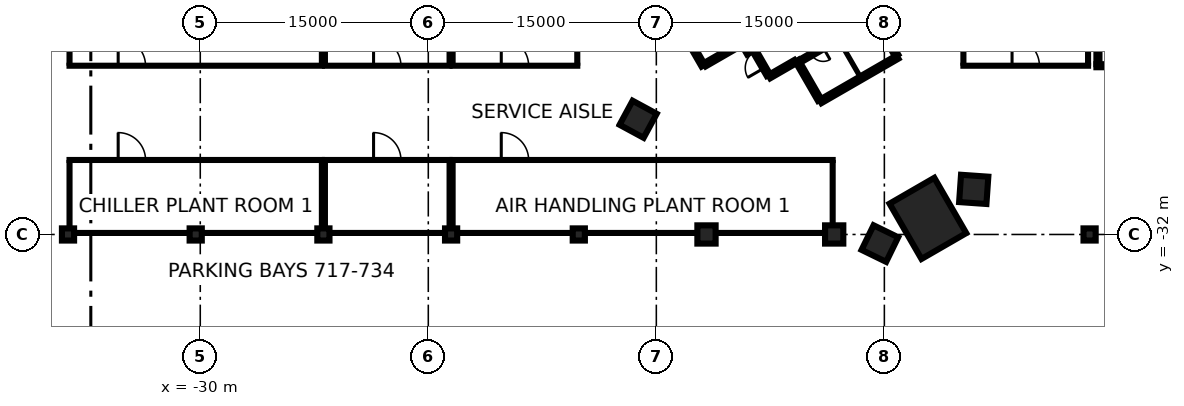
"""IFC4 building model, lengths in metres.
Left out: names, types, materials, properties, quantities, classifications, styles, units other than length and angle.
Written with IfcOpenShell. Run it as: python <this file> out.ifc"""

import sys

from ifc_helpers import new_model, si_unit, direction, frame, frame_2d, origin, origin_2d, place, context, subcontext, project, spatial, rectangle, extrude, element, fill, save


model = new_model("IFC4")
c1 = context("Model", 3, precision=1e-05, world=origin(), true_north=direction((0.0, 1.0)))
c2 = subcontext(c1, "Body", "Model", "MODEL_VIEW")
j1 = project(units=[si_unit("LENGTHUNIT", "METRE"), si_unit("PLANEANGLEUNIT", "RADIAN")], contexts=[c1])
p1 = place(None, origin())
s1 = spatial("IfcSite", under=j1, at=p1, CompositionType="ELEMENT")
p2 = place(p1, origin())
s2 = spatial("IfcBuilding", under=s1, at=p2, CompositionType="ELEMENT")
p3 = place(p2, frame((0.0, 0.0, -7.2)))
s3 = spatial("IfcBuildingStorey", under=s2, at=p3, CompositionType="ELEMENT", Elevation=-7.2)
p4 = place(p3, frame((17.865, -30.942, -0.4), z_axis=(0.0, 0.0, 1.0), x_axis=(-0.5, 0.866025403784, 0.0)))
e1 = element("IfcColumn", 1, at=p4, inside=s3, PredefinedType="COLUMN", context=c2, shape_type="SweptSolid", body=[
    extrude(rectangle(XDim=4.2, YDim=3.4, at=origin_2d()), origin(), (0.0, 0.0, 1.0), 3.6),
])
for number, where, z_axis, x_axis in (
    (2, (20.879, -29.034, -0.4), (0.0, 0.0, 1.0), (-0.998, 0.07, 0.0)),
    (3, (-1.197, -24.423, -0.4), (0.0, 0.0, 1.0), (0.476, 0.879, 0.0)),
    (4, (14.705, -32.599, -0.4), (0.0, 0.0, 1.0), (0.438, 0.899, 0.0)),
):
    element("IfcColumn", number, at=place(p3, frame(where, z_axis=z_axis, x_axis=x_axis)), inside=s3, PredefinedType="COLUMN", context=c2, shape_type="SweptSolid", body=[
        extrude(rectangle(XDim=1.8, YDim=1.8, at=origin_2d()), origin(), (0.0, 0.0, 1.0), 3.6),
    ])
for number, where, z_axis, x_axis in (
    (5, (-38.7, -32.0, -0.4), (0.0, 0.0, 1.0), (1.0, 0.0, 0.0)),
    (6, (-30.3, -32.0, -0.4), (0.0, 0.0, 1.0), (1.0, 0.0, 0.0)),
    (7, (-21.9, -32.0, -0.4), (0.0, 0.0, 1.0), (1.0, 0.0, 0.0)),
    (8, (-13.5, -32.0, -0.4), (0.0, 0.0, 1.0), (1.0, 0.0, 0.0)),
    (9, (-5.1, -32.0, -0.4), (0.0, 0.0, 1.0), (1.0, 0.0, 0.0)),
):
    element("IfcColumn", number, at=place(p3, frame(where, z_axis=z_axis, x_axis=x_axis)), inside=s3, PredefinedType="COLUMN", context=c2, shape_type="SweptSolid", body=[
        extrude(rectangle(XDim=0.8, YDim=0.8, at=origin_2d()), origin(), (0.0, 0.0, 1.0), 3.6),
    ])
for number, where, z_axis, x_axis in (
    (10, (3.3, -32.0, -0.4), (0.0, 0.0, 1.0), (1.0, 0.0, 0.0)),
    (11, (11.7, -32.0, -0.4), (0.0, 0.0, 1.0), (1.0, 0.0, 0.0)),
):
    element("IfcColumn", number, at=place(p3, frame(where, z_axis=z_axis, x_axis=x_axis)), inside=s3, PredefinedType="COLUMN", context=c2, shape_type="SweptSolid", body=[
        extrude(rectangle(XDim=1.2, YDim=1.2, at=origin_2d()), origin(), (0.0, 0.0, 1.0), 3.6),
    ])
p5 = place(p3, frame((28.5, -32.0, -0.4), z_axis=(0.0, 0.0, 1.0), x_axis=(1.0, 0.0, 0.0)))
e12 = element("IfcColumn", 12, at=p5, inside=s3, PredefinedType="COLUMN", context=c2, shape_type="SweptSolid", body=[
    extrude(rectangle(XDim=0.8, YDim=0.8, at=origin_2d()), origin(), (0.0, 0.0, 1.0), 3.6),
])
p6 = place(p3, frame((15.865, -20.328, 0.0), z_axis=(0.0, 0.0, 1.0), x_axis=(-0.86602852612, -0.499994591916, 0.0)))
e13 = element("IfcWall", 13, at=p6, inside=s3, PredefinedType="SHEAR", context=c2, shape_type="SweptSolid", body=[
    extrude(rectangle(XDim=5.85, YDim=0.25, at=frame_2d((2.925, 0.0))), origin(), (0.0, 0.0, 1.0), 3.2),
])
for number, where, z_axis, x_axis in (
    (14, (14.315, -17.644, 0.0), (0.0, 0.0, 1.0), (0.5, -0.866, 0.0)),
    (15, (10.736, -23.145, 0.0), (0.0, 0.0, 1.0), (-0.5, 0.866, 0.0)),
):
    element("IfcWall", number, at=place(p3, frame(where, z_axis=z_axis, x_axis=x_axis)), inside=s3, PredefinedType="SHEAR", context=c2, shape_type="SweptSolid", body=[
        extrude(rectangle(XDim=2.974, YDim=0.25, at=frame_2d((1.487, 0.0))), origin(), (0.0, 0.0, 1.0), 3.2),
    ])
p7 = place(p3, frame((3.085, -20.894, 0.0), z_axis=(0.0, 0.0, 1.0), x_axis=(-0.499978833458, 0.866037623948, 0.0)))
e16 = element("IfcWall", 16, at=p7, inside=s3, PredefinedType="SHEAR", context=c2, shape_type="SweptSolid", body=[
    extrude(rectangle(XDim=3.05, YDim=0.25, at=frame_2d((1.525, 0.0))), origin(), (0.0, 0.0, 1.0), 3.2),
])
p8 = place(p3, frame((5.675, -19.399, 0.0), z_axis=(0.0, 0.0, 1.0), x_axis=(-0.866026637627, -0.499997862916, 0.0)))
e17 = element("IfcWall", 17, at=p8, inside=s3, PredefinedType="SHEAR", context=c2, shape_type="SweptSolid", body=[
    extrude(rectangle(XDim=2.865, YDim=0.25, at=frame_2d((1.432, 0.0))), origin(), (0.0, 0.0, 1.0), 3.2),
])
p9 = place(p3, frame((9.14, -20.631, 0.0), z_axis=(0.0, 0.0, 1.0), x_axis=(-0.866043531843, -0.499968599967, 0.0)))
e18 = element("IfcWall", 18, at=p9, inside=s3, PredefinedType="SHEAR", context=c2, shape_type="SweptSolid", body=[
    extrude(rectangle(XDim=1.975, YDim=0.25, at=frame_2d((0.987, 0.0))), origin(), (0.0, 0.0, 1.0), 3.2),
])
p10 = place(p3, frame((7.367, -21.51, 0.0), z_axis=(0.0, 0.0, 1.0), x_axis=(-0.499983108224, 0.866035156036, 0.0)))
e19 = element("IfcWall", 19, at=p10, inside=s3, PredefinedType="SHEAR", context=c2, shape_type="SweptSolid", body=[
    extrude(rectangle(XDim=1.865, YDim=0.25, at=frame_2d((0.932, 0.0))), origin(), (0.0, 0.0, 1.0), 3.2),
])
p11 = place(p10, frame((0.535, 0.0, 0.0)))
e20 = element("IfcOpeningElement", 20, at=p11, cuts=e19, PredefinedType="OPENING", context=c2, shape_type="SweptSolid", body=[
    extrude(rectangle(XDim=1.25, YDim=2.1, at=frame_2d((0.625, 1.05))), frame((0.0, 0.135, 0.0), z_axis=(0.0, -1.0, 0.0), x_axis=(1.0, 0.0, 0.0)), (0.0, 0.0, 1.0), 0.27),
])
p12 = place(p3, frame((6.08, -20.1, 0.0), z_axis=(0.0, 0.0, 1.0), x_axis=(-0.500051773299, 0.865995510393, 0.0)))
e21 = element("IfcWall", 21, at=p12, inside=s3, PredefinedType="SHEAR", context=c2, shape_type="SweptSolid", body=[
    extrude(rectangle(XDim=0.685, YDim=0.25, at=frame_2d((0.342, 0.0))), origin(), (0.0, 0.0, 1.0), 3.2),
])
p13 = place(p3, frame((14.268, -17.815, 0.0), z_axis=(0.0, 0.0, 1.0), x_axis=(-0.866033794273, -0.499985466966, 0.0)))
e22 = element("IfcWall", 22, at=p13, inside=s3, PredefinedType="SHEAR", context=c2, shape_type="SweptSolid", body=[
    extrude(rectangle(XDim=5.598, YDim=0.2, at=frame_2d((2.799, 0.0))), origin(), (0.0, 0.0, 1.0), 3.2),
])
p14 = place(p13, frame((3.799, 0.0, 0.0)))
e23 = element("IfcOpeningElement", 23, at=p14, cuts=e22, PredefinedType="OPENING", context=c2, shape_type="SweptSolid", body=[
    extrude(rectangle(XDim=0.9, YDim=2.1, at=frame_2d((0.45, 1.05))), frame((0.0, 0.11, 0.0), z_axis=(0.0, -1.0, 0.0), x_axis=(1.0, 0.0, 0.0)), (0.0, 0.0, 1.0), 0.22),
])
p15 = place(p13, frame((0.749, 0.0, 0.0)))
e24 = element("IfcOpeningElement", 24, at=p15, cuts=e22, PredefinedType="OPENING", context=c2, shape_type="SweptSolid", body=[
    extrude(rectangle(XDim=0.9, YDim=2.1, at=frame_2d((0.45, 1.05))), frame((0.0, 0.11, 0.0), z_axis=(0.0, -1.0, 0.0), x_axis=(1.0, 0.0, 0.0)), (0.0, 0.0, 1.0), 0.22),
])
p16 = place(p3, frame((12.024, -19.227, 0.0), z_axis=(0.0, 0.0, 1.0), x_axis=(0.499988999718, -0.866031754707, 0.0)))
e25 = element("IfcWall", 25, at=p16, inside=s3, PredefinedType="PARTITIONING", context=c2, shape_type="SweptSolid", body=[
    extrude(rectangle(XDim=2.749, YDim=0.15, at=frame_2d((1.374, 0.0))), origin(), (0.0, 0.0, 1.0), 3.2),
])
p17 = place(p3, frame((-38.7, -31.9, 0.0), z_axis=(0.0, 0.0, 1.0), x_axis=(1.0, 0.0, 0.0)))
e26 = element("IfcWall", 26, at=p17, inside=s3, PredefinedType="PARTITIONING", context=c2, shape_type="SweptSolid", body=[
    extrude(rectangle(XDim=16.8, YDim=0.2, at=frame_2d((8.4, 0.0))), origin(), (0.0, 0.0, 1.0), 3.2),
])
p18 = place(p3, frame((-38.7, -27.1, 0.0), z_axis=(0.0, 0.0, 1.0), x_axis=(1.0, 0.0, 0.0)))
e27 = element("IfcWall", 27, at=p18, inside=s3, PredefinedType="PARTITIONING", context=c2, shape_type="SweptSolid", body=[
    extrude(rectangle(XDim=16.8, YDim=0.2, at=frame_2d((8.4, 0.0))), origin(), (0.0, 0.0, 1.0), 3.2),
])
p19 = place(p18, frame((3.3, 0.0, 0.0)))
e28 = element("IfcOpeningElement", 28, at=p19, cuts=e27, PredefinedType="OPENING", context=c2, shape_type="SweptSolid", body=[
    extrude(rectangle(XDim=1.8, YDim=2.1, at=frame_2d((0.9, 1.05))), frame((0.0, 0.11, 0.0), z_axis=(0.0, -1.0, 0.0), x_axis=(1.0, 0.0, 0.0)), (0.0, 0.0, 1.0), 0.22),
])
for number, where, z_axis, x_axis in (
    (29, (-38.6, -31.6, 0.0), (0.0, 0.0, 1.0), (0.0, 1.0, 0.0)),
    (30, (-22.0, -31.6, 0.0), (0.0, 0.0, 1.0), (0.0, 1.0, 0.0)),
):
    element("IfcWall", number, at=place(p3, frame(where, z_axis=z_axis, x_axis=x_axis)), inside=s3, PredefinedType="PARTITIONING", context=c2, shape_type="SweptSolid", body=[
        extrude(rectangle(XDim=4.4, YDim=0.2, at=frame_2d((2.2, 0.0))), origin(), (0.0, 0.0, 1.0), 3.2),
    ])
p20 = place(p3, frame((-21.9, -31.9, 0.0), z_axis=(0.0, 0.0, 1.0), x_axis=(1.0, 0.0, 0.0)))
e31 = element("IfcWall", 31, at=p20, inside=s3, PredefinedType="PARTITIONING", context=c2, shape_type="SweptSolid", body=[
    extrude(rectangle(XDim=8.4, YDim=0.2, at=frame_2d((4.2, 0.0))), origin(), (0.0, 0.0, 1.0), 3.2),
])
p21 = place(p3, frame((-21.9, -27.1, 0.0), z_axis=(0.0, 0.0, 1.0), x_axis=(1.0, 0.0, 0.0)))
e32 = element("IfcWall", 32, at=p21, inside=s3, PredefinedType="PARTITIONING", context=c2, shape_type="SweptSolid", body=[
    extrude(rectangle(XDim=8.4, YDim=0.2, at=frame_2d((4.2, 0.0))), origin(), (0.0, 0.0, 1.0), 3.2),
])
p22 = place(p21, frame((3.3, 0.0, 0.0)))
e33 = element("IfcOpeningElement", 33, at=p22, cuts=e32, PredefinedType="OPENING", context=c2, shape_type="SweptSolid", body=[
    extrude(rectangle(XDim=1.8, YDim=2.1, at=frame_2d((0.9, 1.05))), frame((0.0, 0.11, 0.0), z_axis=(0.0, -1.0, 0.0), x_axis=(1.0, 0.0, 0.0)), (0.0, 0.0, 1.0), 0.22),
])
for number, where, z_axis, x_axis in (
    (34, (-21.8, -31.6, 0.0), (0.0, 0.0, 1.0), (0.0, 1.0, 0.0)),
    (35, (-13.6, -31.6, 0.0), (0.0, 0.0, 1.0), (0.0, 1.0, 0.0)),
):
    element("IfcWall", number, at=place(p3, frame(where, z_axis=z_axis, x_axis=x_axis)), inside=s3, PredefinedType="PARTITIONING", context=c2, shape_type="SweptSolid", body=[
        extrude(rectangle(XDim=4.4, YDim=0.2, at=frame_2d((2.2, 0.0))), origin(), (0.0, 0.0, 1.0), 3.2),
    ])
p23 = place(p3, frame((-13.5, -31.9, 0.0), z_axis=(0.0, 0.0, 1.0), x_axis=(1.0, 0.0, 0.0)))
e36 = element("IfcWall", 36, at=p23, inside=s3, PredefinedType="PARTITIONING", context=c2, shape_type="SweptSolid", body=[
    extrude(rectangle(XDim=25.2, YDim=0.2, at=frame_2d((12.6, 0.0))), origin(), (0.0, 0.0, 1.0), 3.2),
])
p24 = place(p3, frame((-13.5, -27.1, 0.0), z_axis=(0.0, 0.0, 1.0), x_axis=(1.0, 0.0, 0.0)))
e37 = element("IfcWall", 37, at=p24, inside=s3, PredefinedType="PARTITIONING", context=c2, shape_type="SweptSolid", body=[
    extrude(rectangle(XDim=25.2, YDim=0.2, at=frame_2d((12.6, 0.0))), origin(), (0.0, 0.0, 1.0), 3.2),
])
p25 = place(p24, frame((3.3, 0.0, 0.0)))
e38 = element("IfcOpeningElement", 38, at=p25, cuts=e37, PredefinedType="OPENING", context=c2, shape_type="SweptSolid", body=[
    extrude(rectangle(XDim=1.8, YDim=2.1, at=frame_2d((0.9, 1.05))), frame((0.0, 0.11, 0.0), z_axis=(0.0, -1.0, 0.0), x_axis=(1.0, 0.0, 0.0)), (0.0, 0.0, 1.0), 0.22),
])
p26 = place(p3, frame((-13.4, -31.6, 0.0), z_axis=(0.0, 0.0, 1.0), x_axis=(0.0, 1.0, 0.0)))
e39 = element("IfcWall", 39, at=p26, inside=s3, PredefinedType="PARTITIONING", context=c2, shape_type="SweptSolid", body=[
    extrude(rectangle(XDim=4.4, YDim=0.2, at=frame_2d((2.2, 0.0))), origin(), (0.0, 0.0, 1.0), 3.2),
])
p27 = place(p3, frame((11.6, -31.4, 0.0), z_axis=(0.0, 0.0, 1.0), x_axis=(0.0, 1.0, 0.0)))
e40 = element("IfcWall", 40, at=p27, inside=s3, PredefinedType="PARTITIONING", context=c2, shape_type="SweptSolid", body=[
    extrude(rectangle(XDim=4.2, YDim=0.2, at=frame_2d((2.1, 0.0))), origin(), (0.0, 0.0, 1.0), 3.2),
])
p28 = place(p3, frame((-38.7, -20.9, 0.0), z_axis=(0.0, 0.0, 1.0), x_axis=(1.0, 0.0, 0.0)))
e41 = element("IfcWall", 41, at=p28, inside=s3, PredefinedType="PARTITIONING", context=c2, shape_type="SweptSolid", body=[
    extrude(rectangle(XDim=16.8, YDim=0.2, at=frame_2d((8.4, 0.0))), origin(), (0.0, 0.0, 1.0), 3.2),
])
p29 = place(p28, frame((3.3, 0.0, 0.0)))
e42 = element("IfcOpeningElement", 42, at=p29, cuts=e41, PredefinedType="OPENING", context=c2, shape_type="SweptSolid", body=[
    extrude(rectangle(XDim=1.8, YDim=2.1, at=frame_2d((0.9, 1.05))), frame((0.0, 0.11, 0.0), z_axis=(0.0, -1.0, 0.0), x_axis=(1.0, 0.0, 0.0)), (0.0, 0.0, 1.0), 0.22),
])
for number, where, z_axis, x_axis in (
    (43, (-38.6, -20.8, 0.0), (0.0, 0.0, 1.0), (0.0, 1.0, 0.0)),
    (44, (-22.0, -20.8, 0.0), (0.0, 0.0, 1.0), (0.0, 1.0, 0.0)),
):
    element("IfcWall", number, at=place(p3, frame(where, z_axis=z_axis, x_axis=x_axis)), inside=s3, PredefinedType="PARTITIONING", context=c2, shape_type="SweptSolid", body=[
        extrude(rectangle(XDim=4.2, YDim=0.2, at=frame_2d((2.1, 0.0))), origin(), (0.0, 0.0, 1.0), 3.2),
    ])
p30 = place(p3, frame((-21.9, -20.9, 0.0), z_axis=(0.0, 0.0, 1.0), x_axis=(1.0, 0.0, 0.0)))
e45 = element("IfcWall", 45, at=p30, inside=s3, PredefinedType="PARTITIONING", context=c2, shape_type="SweptSolid", body=[
    extrude(rectangle(XDim=8.4, YDim=0.2, at=frame_2d((4.2, 0.0))), origin(), (0.0, 0.0, 1.0), 3.2),
])
p31 = place(p30, frame((3.3, 0.0, 0.0)))
e46 = element("IfcOpeningElement", 46, at=p31, cuts=e45, PredefinedType="OPENING", context=c2, shape_type="SweptSolid", body=[
    extrude(rectangle(XDim=1.8, YDim=2.1, at=frame_2d((0.9, 1.05))), frame((0.0, 0.11, 0.0), z_axis=(0.0, -1.0, 0.0), x_axis=(1.0, 0.0, 0.0)), (0.0, 0.0, 1.0), 0.22),
])
for number, where, z_axis, x_axis in (
    (47, (-21.8, -20.8, 0.0), (0.0, 0.0, 1.0), (0.0, 1.0, 0.0)),
    (48, (-13.6, -20.8, 0.0), (0.0, 0.0, 1.0), (0.0, 1.0, 0.0)),
):
    element("IfcWall", number, at=place(p3, frame(where, z_axis=z_axis, x_axis=x_axis)), inside=s3, PredefinedType="PARTITIONING", context=c2, shape_type="SweptSolid", body=[
        extrude(rectangle(XDim=4.2, YDim=0.2, at=frame_2d((2.1, 0.0))), origin(), (0.0, 0.0, 1.0), 3.2),
    ])
p32 = place(p3, frame((-13.5, -20.9, 0.0), z_axis=(0.0, 0.0, 1.0), x_axis=(1.0, 0.0, 0.0)))
e49 = element("IfcWall", 49, at=p32, inside=s3, PredefinedType="PARTITIONING", context=c2, shape_type="SweptSolid", body=[
    extrude(rectangle(XDim=8.4, YDim=0.2, at=frame_2d((4.2, 0.0))), origin(), (0.0, 0.0, 1.0), 3.2),
])
p33 = place(p32, frame((3.3, 0.0, 0.0)))
e50 = element("IfcOpeningElement", 50, at=p33, cuts=e49, PredefinedType="OPENING", context=c2, shape_type="SweptSolid", body=[
    extrude(rectangle(XDim=1.8, YDim=2.1, at=frame_2d((0.9, 1.05))), frame((0.0, 0.11, 0.0), z_axis=(0.0, -1.0, 0.0), x_axis=(1.0, 0.0, 0.0)), (0.0, 0.0, 1.0), 0.22),
])
for number, where, z_axis, x_axis in (
    (51, (-13.4, -20.8, 0.0), (0.0, 0.0, 1.0), (0.0, 1.0, 0.0)),
    (52, (-5.2, -20.8, 0.0), (0.0, 0.0, 1.0), (0.0, 1.0, 0.0)),
):
    element("IfcWall", number, at=place(p3, frame(where, z_axis=z_axis, x_axis=x_axis)), inside=s3, PredefinedType="PARTITIONING", context=c2, shape_type="SweptSolid", body=[
        extrude(rectangle(XDim=4.2, YDim=0.2, at=frame_2d((2.1, 0.0))), origin(), (0.0, 0.0, 1.0), 3.2),
    ])
p34 = place(p3, frame((20.1, -20.9, 0.0), z_axis=(0.0, 0.0, 1.0), x_axis=(1.0, 0.0, 0.0)))
e53 = element("IfcWall", 53, at=p34, inside=s3, PredefinedType="PARTITIONING", context=c2, shape_type="SweptSolid", body=[
    extrude(rectangle(XDim=8.4, YDim=0.2, at=frame_2d((4.2, 0.0))), origin(), (0.0, 0.0, 1.0), 3.2),
])
p35 = place(p34, frame((3.3, 0.0, 0.0)))
e54 = element("IfcOpeningElement", 54, at=p35, cuts=e53, PredefinedType="OPENING", context=c2, shape_type="SweptSolid", body=[
    extrude(rectangle(XDim=1.8, YDim=2.1, at=frame_2d((0.9, 1.05))), frame((0.0, 0.11, 0.0), z_axis=(0.0, -1.0, 0.0), x_axis=(1.0, 0.0, 0.0)), (0.0, 0.0, 1.0), 0.22),
])
p36 = place(p3, frame((20.2, -20.8, 0.0), z_axis=(0.0, 0.0, 1.0), x_axis=(0.0, 1.0, 0.0)))
e55 = element("IfcWall", 55, at=p36, inside=s3, PredefinedType="PARTITIONING", context=c2, shape_type="SweptSolid", body=[
    extrude(rectangle(XDim=4.2, YDim=0.2, at=frame_2d((2.1, 0.0))), origin(), (0.0, 0.0, 1.0), 3.2),
])
p37 = place(p3, frame((28.4, -20.8, 0.0), z_axis=(0.0, 0.0, 1.0), x_axis=(0.0, 1.0, 0.0)))
e56 = element("IfcWall", 56, at=p37, inside=s3, PredefinedType="PARTITIONING", context=c2, shape_type="SweptSolid", body=[
    extrude(rectangle(XDim=4.4, YDim=0.2, at=frame_2d((2.2, 0.0))), origin(), (0.0, 0.0, 1.0), 3.2),
])
p38 = place(p3, frame((29.05, -20.8, 0.0), z_axis=(0.0, 0.0, 1.0), x_axis=(0.0, 1.0, 0.0)))
e57 = element("IfcWall", 57, at=p38, inside=s3, PredefinedType="SOLIDWALL", context=c2, shape_type="SweptSolid", body=[
    extrude(rectangle(XDim=9.6, YDim=0.2, at=frame_2d((4.8, 0.0))), origin(), (0.0, 0.0, 1.0), 3.2),
])
p39 = place(p3, frame((33.5, -20.9, 0.0), z_axis=(0.0, 0.0, 1.0), x_axis=(-1.0, 0.0, 0.0)))
e58 = element("IfcWall", 58, at=p39, inside=s3, PredefinedType="SOLIDWALL", context=c2, shape_type="SweptSolid", body=[
    extrude(rectangle(XDim=4.55, YDim=0.2, at=frame_2d((2.275, 0.0))), origin(), (0.0, 0.0, 1.0), 3.2),
])
p40 = place(p11, origin())
e59 = element("IfcDoor", 59, at=p40, inside=s3, OperationType="SINGLE_SWING_LEFT", PredefinedType="DOOR", context=c2, shape_type="SweptSolid", body=[
    extrude(rectangle(XDim=1.25, YDim=2.1, at=frame_2d((0.625, 1.05))), frame((0.0, 0.025, 0.0), z_axis=(0.0, -1.0, 0.0), x_axis=(1.0, 0.0, 0.0)), (0.0, 0.0, 1.0), 0.05),
])
fill(e20, e59)
p41 = place(p14, origin())
e60 = element("IfcDoor", 60, at=p41, inside=s3, OperationType="SINGLE_SWING_LEFT", PredefinedType="DOOR", context=c2, shape_type="SweptSolid", body=[
    extrude(rectangle(XDim=0.9, YDim=2.1, at=frame_2d((0.45, 1.05))), frame((0.0, 0.025, 0.0), z_axis=(0.0, -1.0, 0.0), x_axis=(1.0, 0.0, 0.0)), (0.0, 0.0, 1.0), 0.05),
])
fill(e23, e60)
p42 = place(p19, origin())
e61 = element("IfcDoor", 61, at=p42, inside=s3, OperationType="DOUBLE_DOOR_SINGLE_SWING", PredefinedType="DOOR", context=c2, shape_type="SweptSolid", body=[
    extrude(rectangle(XDim=1.8, YDim=2.1, at=frame_2d((0.9, 1.05))), frame((0.0, 0.025, 0.0), z_axis=(0.0, -1.0, 0.0), x_axis=(1.0, 0.0, 0.0)), (0.0, 0.0, 1.0), 0.05),
])
fill(e28, e61)
p43 = place(p22, origin())
e62 = element("IfcDoor", 62, at=p43, inside=s3, OperationType="DOUBLE_DOOR_SINGLE_SWING", PredefinedType="DOOR", context=c2, shape_type="SweptSolid", body=[
    extrude(rectangle(XDim=1.8, YDim=2.1, at=frame_2d((0.9, 1.05))), frame((0.0, 0.025, 0.0), z_axis=(0.0, -1.0, 0.0), x_axis=(1.0, 0.0, 0.0)), (0.0, 0.0, 1.0), 0.05),
])
fill(e33, e62)
p44 = place(p25, origin())
e63 = element("IfcDoor", 63, at=p44, inside=s3, OperationType="DOUBLE_DOOR_SINGLE_SWING", PredefinedType="DOOR", context=c2, shape_type="SweptSolid", body=[
    extrude(rectangle(XDim=1.8, YDim=2.1, at=frame_2d((0.9, 1.05))), frame((0.0, 0.025, 0.0), z_axis=(0.0, -1.0, 0.0), x_axis=(1.0, 0.0, 0.0)), (0.0, 0.0, 1.0), 0.05),
])
fill(e38, e63)
p45 = place(p29, origin())
e64 = element("IfcDoor", 64, at=p45, inside=s3, OperationType="DOUBLE_DOOR_SINGLE_SWING", PredefinedType="DOOR", context=c2, shape_type="SweptSolid", body=[
    extrude(rectangle(XDim=1.8, YDim=2.1, at=frame_2d((0.9, 1.05))), frame((0.0, 0.025, 0.0), z_axis=(0.0, -1.0, 0.0), x_axis=(1.0, 0.0, 0.0)), (0.0, 0.0, 1.0), 0.05),
])
fill(e42, e64)
p46 = place(p31, origin())
e65 = element("IfcDoor", 65, at=p46, inside=s3, OperationType="DOUBLE_DOOR_SINGLE_SWING", PredefinedType="DOOR", context=c2, shape_type="SweptSolid", body=[
    extrude(rectangle(XDim=1.8, YDim=2.1, at=frame_2d((0.9, 1.05))), frame((0.0, 0.025, 0.0), z_axis=(0.0, -1.0, 0.0), x_axis=(1.0, 0.0, 0.0)), (0.0, 0.0, 1.0), 0.05),
])
fill(e46, e65)
p47 = place(p33, origin())
e66 = element("IfcDoor", 66, at=p47, inside=s3, OperationType="DOUBLE_DOOR_SINGLE_SWING", PredefinedType="DOOR", context=c2, shape_type="SweptSolid", body=[
    extrude(rectangle(XDim=1.8, YDim=2.1, at=frame_2d((0.9, 1.05))), frame((0.0, 0.025, 0.0), z_axis=(0.0, -1.0, 0.0), x_axis=(1.0, 0.0, 0.0)), (0.0, 0.0, 1.0), 0.05),
])
fill(e50, e66)
p48 = place(p35, origin())
e67 = element("IfcDoor", 67, at=p48, inside=s3, OperationType="DOUBLE_DOOR_SINGLE_SWING", PredefinedType="DOOR", context=c2, shape_type="SweptSolid", body=[
    extrude(rectangle(XDim=1.8, YDim=2.1, at=frame_2d((0.9, 1.05))), frame((0.0, 0.025, 0.0), z_axis=(0.0, -1.0, 0.0), x_axis=(1.0, 0.0, 0.0)), (0.0, 0.0, 1.0), 0.05),
])
fill(e54, e67)
save(model, sys.argv[1])
